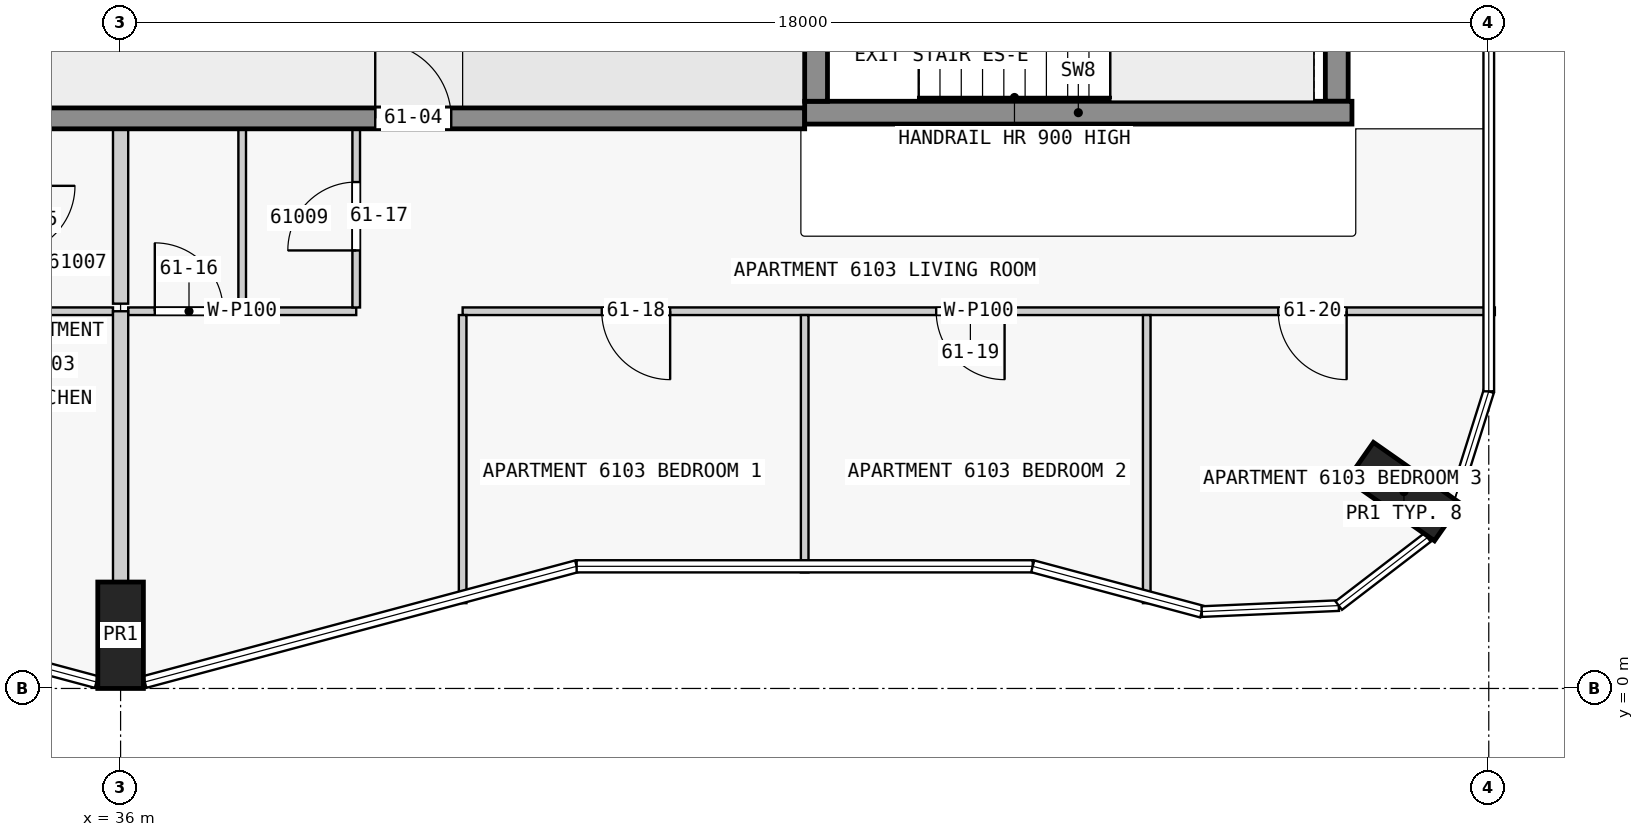
"""IFC4 building model, lengths in metres.
Left out: names, types, materials, properties, quantities, classifications, styles, units other than length and angle.
Written with IfcOpenShell. Run it as: python <this file> out.ifc"""

import sys

from ifc_helpers import new_model, si_unit, direction, frame, frame_2d, origin, origin_2d, place, context, subcontext, project, spatial, rectangle, extrude, element, fill, save


model = new_model("IFC4")
c1 = context("Model", 3, precision=1e-05, world=origin(), true_north=direction((0.0, 1.0)))
c2 = subcontext(c1, "Body", "Model", "MODEL_VIEW")
j1 = project(units=[si_unit("LENGTHUNIT", "METRE"), si_unit("PLANEANGLEUNIT", "RADIAN")], contexts=[c1])
p1 = place(None, origin())
s1 = spatial("IfcSite", under=j1, at=p1, CompositionType="ELEMENT")
p2 = place(p1, origin())
s2 = spatial("IfcBuilding", under=s1, at=p2, CompositionType="ELEMENT")
p3 = place(p2, frame((0.0, 0.0, 232.9)))
s3 = spatial("IfcBuildingStorey", under=s2, at=p3, CompositionType="ELEMENT", Elevation=232.9)
for number, where, z_axis, x_axis in (
    (1, (36.0, 0.7, 0.0), (0.0, 0.0, 1.0), (1.0, 0.0, 0.0)),
    (2, (52.884, 2.59, 0.0), (0.0, 0.0, 1.0), (0.574, 0.819, 0.0)),
):
    element("IfcColumn", number, at=place(p3, frame(where, z_axis=z_axis, x_axis=x_axis)), inside=s3, PredefinedType="COLUMN", context=c2, shape_type="SweptSolid", body=[
        extrude(rectangle(XDim=0.6, YDim=1.4, at=origin_2d()), origin(), (0.0, 0.0, 1.0), 3.5),
    ])
p4 = place(p3, frame((45.15, 7.725, 0.0), z_axis=(0.0, 0.0, 1.0), x_axis=(0.0, 1.0, 0.0)))
e3 = element("IfcWall", 3, at=p4, inside=s3, PredefinedType="SHEAR", context=c2, shape_type="SweptSolid", body=[
    extrude(rectangle(XDim=2.55, YDim=0.3, at=frame_2d((1.275, 0.0))), origin(), (0.0, 0.0, 1.0), 3.5),
])
p5 = place(p4, frame((0.725, 0.0, 0.0)))
e4 = element("IfcOpeningElement", 4, at=p5, cuts=e3, PredefinedType="OPENING", context=c2, shape_type="SweptSolid", body=[
    extrude(rectangle(XDim=1.1, YDim=2.1, at=frame_2d((0.55, 1.05))), frame((0.0, 0.16, 0.0), z_axis=(0.0, -1.0, 0.0), x_axis=(1.0, 0.0, 0.0)), (0.0, 0.0, 1.0), 0.32),
])
p6 = place(p3, frame((52.0, 7.725, 0.0), z_axis=(0.0, 0.0, 1.0), x_axis=(0.0, 1.0, 0.0)))
e5 = element("IfcWall", 5, at=p6, inside=s3, PredefinedType="SHEAR", context=c2, shape_type="SweptSolid", body=[
    extrude(rectangle(XDim=2.55, YDim=0.3, at=frame_2d((1.275, 0.0))), origin(), (0.0, 0.0, 1.0), 3.5),
])
p7 = place(p3, frame((45.0, 7.575, 0.0), z_axis=(0.0, 0.0, 1.0), x_axis=(1.0, 0.0, 0.0)))
e6 = element("IfcWall", 6, at=p7, inside=s3, PredefinedType="SHEAR", context=c2, shape_type="SweptSolid", body=[
    extrude(rectangle(XDim=7.2, YDim=0.3, at=frame_2d((3.6, 0.0))), origin(), (0.0, 0.0, 1.0), 3.5),
])
p8 = place(p3, frame((22.5, 7.5, 0.0), z_axis=(0.0, 0.0, 1.0), x_axis=(1.0, 0.0, 0.0)))
e7 = element("IfcWall", 7, at=p8, inside=s3, PredefinedType="SHEAR", context=c2, shape_type="SweptSolid", body=[
    extrude(rectangle(XDim=22.5, YDim=0.275, at=frame_2d((11.25, 0.0))), origin(), (0.0, 0.0, 1.0), 3.2),
])
p9 = place(p8, frame((1.75, 0.0, 0.0)))
e8 = element("IfcOpeningElement", 8, at=p9, cuts=e7, PredefinedType="OPENING", context=c2, shape_type="SweptSolid", body=[
    extrude(rectangle(XDim=1.0, YDim=2.1, at=frame_2d((0.5, 1.05))), frame((0.0, 0.147, 0.0), z_axis=(0.0, -1.0, 0.0), x_axis=(1.0, 0.0, 0.0)), (0.0, 0.0, 1.0), 0.295),
])
p10 = place(p8, frame((5.85, 0.0, 0.0)))
e9 = element("IfcOpeningElement", 9, at=p10, cuts=e7, PredefinedType="OPENING", context=c2, shape_type="SweptSolid", body=[
    extrude(rectangle(XDim=1.8, YDim=2.1, at=frame_2d((0.9, 1.05))), frame((0.0, 0.147, 0.0), z_axis=(0.0, -1.0, 0.0), x_axis=(1.0, 0.0, 0.0)), (0.0, 0.0, 1.0), 0.295),
])
p11 = place(p8, frame((10.75, 0.0, 0.0)))
e10 = element("IfcOpeningElement", 10, at=p11, cuts=e7, PredefinedType="OPENING", context=c2, shape_type="SweptSolid", body=[
    extrude(rectangle(XDim=1.0, YDim=2.1, at=frame_2d((0.5, 1.05))), frame((0.0, 0.147, 0.0), z_axis=(0.0, -1.0, 0.0), x_axis=(1.0, 0.0, 0.0)), (0.0, 0.0, 1.0), 0.295),
])
p12 = place(p8, frame((16.85, 0.0, 0.0)))
e11 = element("IfcOpeningElement", 11, at=p12, cuts=e7, PredefinedType="OPENING", context=c2, shape_type="SweptSolid", body=[
    extrude(rectangle(XDim=1.0, YDim=2.1, at=frame_2d((0.5, 1.05))), frame((0.0, 0.147, 0.0), z_axis=(0.0, -1.0, 0.0), x_axis=(1.0, 0.0, 0.0)), (0.0, 0.0, 1.0), 0.295),
])
p13 = place(p3, frame((54.08, 4.962, 0.0), z_axis=(0.0, 0.0, 1.0), x_axis=(-1.0, 0.0, 0.0)))
e12 = element("IfcWall", 12, at=p13, inside=s3, PredefinedType="PARTITIONING", context=c2, shape_type="SweptSolid", body=[
    extrude(rectangle(XDim=13.58, YDim=0.1, at=frame_2d((6.79, 0.0))), origin(), (0.0, 0.0, 1.0), 3.2),
])
p14 = place(p13, frame((10.85, 0.0, 0.0)))
e13 = element("IfcOpeningElement", 13, at=p14, cuts=e12, PredefinedType="OPENING", context=c2, shape_type="SweptSolid", body=[
    extrude(rectangle(XDim=0.9, YDim=2.1, at=frame_2d((0.45, 1.05))), frame((0.0, 0.06, 0.0), z_axis=(0.0, -1.0, 0.0), x_axis=(1.0, 0.0, 0.0)), (0.0, 0.0, 1.0), 0.12),
])
p15 = place(p13, frame((6.45, 0.0, 0.0)))
e14 = element("IfcOpeningElement", 14, at=p15, cuts=e12, PredefinedType="OPENING", context=c2, shape_type="SweptSolid", body=[
    extrude(rectangle(XDim=0.9, YDim=2.1, at=frame_2d((0.45, 1.05))), frame((0.0, 0.06, 0.0), z_axis=(0.0, -1.0, 0.0), x_axis=(1.0, 0.0, 0.0)), (0.0, 0.0, 1.0), 0.12),
])
p16 = place(p13, frame((1.95, 0.0, 0.0)))
e15 = element("IfcOpeningElement", 15, at=p16, cuts=e12, PredefinedType="OPENING", context=c2, shape_type="SweptSolid", body=[
    extrude(rectangle(XDim=0.9, YDim=2.1, at=frame_2d((0.45, 1.05))), frame((0.0, 0.06, 0.0), z_axis=(0.0, -1.0, 0.0), x_axis=(1.0, 0.0, 0.0)), (0.0, 0.0, 1.0), 0.12),
])
p17 = place(p3, frame((34.5, 4.962, 0.0), z_axis=(0.0, 0.0, 1.0), x_axis=(1.0, 0.0, 0.0)))
e16 = element("IfcWall", 16, at=p17, inside=s3, PredefinedType="PARTITIONING", context=c2, shape_type="SweptSolid", body=[
    extrude(rectangle(XDim=1.4, YDim=0.1, at=frame_2d((0.7, 0.0))), origin(), (0.0, 0.0, 1.0), 3.2),
])
p18 = place(p3, frame((36.1, 4.962, 0.0), z_axis=(0.0, 0.0, 1.0), x_axis=(1.0, 0.0, 0.0)))
e17 = element("IfcWall", 17, at=p18, inside=s3, PredefinedType="PARTITIONING", context=c2, shape_type="SweptSolid", body=[
    extrude(rectangle(XDim=3.0, YDim=0.1, at=frame_2d((1.5, 0.0))), origin(), (0.0, 0.0, 1.0), 3.2),
])
p19 = place(p18, frame((0.35, 0.0, 0.0)))
e18 = element("IfcOpeningElement", 18, at=p19, cuts=e17, PredefinedType="OPENING", context=c2, shape_type="SweptSolid", body=[
    extrude(rectangle(XDim=0.9, YDim=2.1, at=frame_2d((0.45, 1.05))), frame((0.0, 0.06, 0.0), z_axis=(0.0, -1.0, 0.0), x_axis=(1.0, 0.0, 0.0)), (0.0, 0.0, 1.0), 0.12),
])
p20 = place(p3, frame((36.0, 4.962, 0.0), z_axis=(0.0, 0.0, 1.0), x_axis=(0.0, -1.0, 0.0)))
e19 = element("IfcWall", 19, at=p20, inside=s3, PredefinedType="PARTITIONING", context=c2, shape_type="SweptSolid", body=[
    extrude(rectangle(XDim=3.562, YDim=0.2, at=frame_2d((1.781, 0.0))), origin(), (0.0, 0.0, 1.0), 3.2),
])
p21 = place(p3, frame((36.0, 5.062, 0.0), z_axis=(0.0, 0.0, 1.0), x_axis=(0.0, 1.0, 0.0)))
e20 = element("IfcWall", 20, at=p21, inside=s3, PredefinedType="PARTITIONING", context=c2, shape_type="SweptSolid", body=[
    extrude(rectangle(XDim=2.3, YDim=0.2, at=frame_2d((1.15, 0.0))), origin(), (0.0, 0.0, 1.0), 3.2),
])
p22 = place(p3, frame((37.6, 5.012, 0.0), z_axis=(0.0, 0.0, 1.0), x_axis=(0.0, 1.0, 0.0)))
e21 = element("IfcWall", 21, at=p22, inside=s3, PredefinedType="PARTITIONING", context=c2, shape_type="SweptSolid", body=[
    extrude(rectangle(XDim=2.35, YDim=0.1, at=frame_2d((1.175, 0.0))), origin(), (0.0, 0.0, 1.0), 3.2),
])
p23 = place(p3, frame((39.1, 5.012, 0.0), z_axis=(0.0, 0.0, 1.0), x_axis=(0.0, 1.0, 0.0)))
e22 = element("IfcWall", 22, at=p23, inside=s3, PredefinedType="PARTITIONING", context=c2, shape_type="SweptSolid", body=[
    extrude(rectangle(XDim=2.35, YDim=0.1, at=frame_2d((1.175, 0.0))), origin(), (0.0, 0.0, 1.0), 3.2),
])
p24 = place(p23, frame((0.75, 0.0, 0.0)))
e23 = element("IfcOpeningElement", 23, at=p24, cuts=e22, PredefinedType="OPENING", context=c2, shape_type="SweptSolid", body=[
    extrude(rectangle(XDim=0.9, YDim=2.1, at=frame_2d((0.45, 1.05))), frame((0.0, 0.06, 0.0), z_axis=(0.0, -1.0, 0.0), x_axis=(1.0, 0.0, 0.0)), (0.0, 0.0, 1.0), 0.12),
])
p25 = place(p3, frame((40.5, 4.913, 0.0), z_axis=(0.0, 0.0, 1.0), x_axis=(0.0, -1.0, 0.0)))
e24 = element("IfcWall", 24, at=p25, inside=s3, PredefinedType="PARTITIONING", context=c2, shape_type="SweptSolid", body=[
    extrude(rectangle(XDim=3.79, YDim=0.1, at=frame_2d((1.895, 0.0))), origin(), (0.0, 0.0, 1.0), 3.2),
])
p26 = place(p3, frame((45.0, 1.527, 0.0), z_axis=(0.0, 0.0, 1.0), x_axis=(0.0, 1.0, 0.0)))
e25 = element("IfcWall", 25, at=p26, inside=s3, PredefinedType="PARTITIONING", context=c2, shape_type="SweptSolid", body=[
    extrude(rectangle(XDim=3.386, YDim=0.1, at=frame_2d((1.693, 0.0))), origin(), (0.0, 0.0, 1.0), 3.2),
])
p27 = place(p3, frame((49.5, 1.122, 0.0), z_axis=(0.0, 0.0, 1.0), x_axis=(0.0, 1.0, 0.0)))
e26 = element("IfcWall", 26, at=p27, inside=s3, PredefinedType="PARTITIONING", context=c2, shape_type="SweptSolid", body=[
    extrude(rectangle(XDim=3.79, YDim=0.1, at=frame_2d((1.895, 0.0))), origin(), (0.0, 0.0, 1.0), 3.2),
])
p28 = place(p12, origin())
e27 = element("IfcDoor", 27, at=p28, inside=s3, OperationType="SINGLE_SWING_RIGHT", PredefinedType="DOOR", context=c2, shape_type="SweptSolid", body=[
    extrude(rectangle(XDim=1.0, YDim=2.1, at=frame_2d((0.5, 1.05))), frame((0.0, 0.025, 0.0), z_axis=(0.0, -1.0, 0.0), x_axis=(1.0, 0.0, 0.0)), (0.0, 0.0, 1.0), 0.05),
])
fill(e11, e27)
p29 = place(p19, origin())
e28 = element("IfcDoor", 28, at=p29, inside=s3, OperationType="SINGLE_SWING_LEFT", PredefinedType="DOOR", context=c2, shape_type="SweptSolid", body=[
    extrude(rectangle(XDim=0.9, YDim=2.1, at=frame_2d((0.45, 1.05))), frame((0.0, 0.025, 0.0), z_axis=(0.0, -1.0, 0.0), x_axis=(1.0, 0.0, 0.0)), (0.0, 0.0, 1.0), 0.05),
])
fill(e18, e28)
p30 = place(p24, origin())
e29 = element("IfcDoor", 29, at=p30, inside=s3, OperationType="SINGLE_SWING_RIGHT", PredefinedType="DOOR", context=c2, shape_type="SweptSolid", body=[
    extrude(rectangle(XDim=0.9, YDim=2.1, at=frame_2d((0.45, 1.05))), frame((0.0, 0.025, 0.0), z_axis=(0.0, -1.0, 0.0), x_axis=(1.0, 0.0, 0.0)), (0.0, 0.0, 1.0), 0.05),
])
fill(e23, e29)
p31 = place(p14, origin())
e30 = element("IfcDoor", 30, at=p31, inside=s3, OperationType="SINGLE_SWING_RIGHT", PredefinedType="DOOR", context=c2, shape_type="SweptSolid", body=[
    extrude(rectangle(XDim=0.9, YDim=2.1, at=frame_2d((0.45, 1.05))), frame((0.0, 0.025, 0.0), z_axis=(0.0, -1.0, 0.0), x_axis=(1.0, 0.0, 0.0)), (0.0, 0.0, 1.0), 0.05),
])
fill(e13, e30)
p32 = place(p15, origin())
e31 = element("IfcDoor", 31, at=p32, inside=s3, OperationType="SINGLE_SWING_RIGHT", PredefinedType="DOOR", context=c2, shape_type="SweptSolid", body=[
    extrude(rectangle(XDim=0.9, YDim=2.1, at=frame_2d((0.45, 1.05))), frame((0.0, 0.025, 0.0), z_axis=(0.0, -1.0, 0.0), x_axis=(1.0, 0.0, 0.0)), (0.0, 0.0, 1.0), 0.05),
])
fill(e14, e31)
p33 = place(p16, origin())
e32 = element("IfcDoor", 32, at=p33, inside=s3, OperationType="SINGLE_SWING_LEFT", PredefinedType="DOOR", context=c2, shape_type="SweptSolid", body=[
    extrude(rectangle(XDim=0.9, YDim=2.1, at=frame_2d((0.45, 1.05))), frame((0.0, 0.025, 0.0), z_axis=(0.0, -1.0, 0.0), x_axis=(1.0, 0.0, 0.0)), (0.0, 0.0, 1.0), 0.05),
])
fill(e15, e32)
save(model, sys.argv[1])
